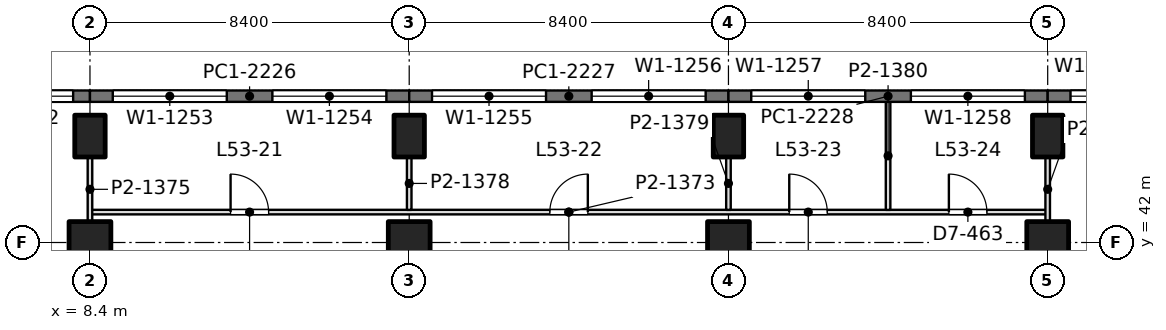
"""IFC4 building model, lengths in metres.
Left out: names, types, materials, properties, quantities, classifications, styles, units other than length and angle.
Written with IfcOpenShell. Run it as: python <this file> out.ifc"""

import sys

from ifc_helpers import new_model, si_unit, direction, frame, frame_2d, origin, origin_2d, place, context, subcontext, project, spatial, rectangle, extrude, element, fill, save


model = new_model("IFC4")
c1 = context("Model", 3, precision=1e-05, world=origin(), true_north=direction((0.0, 1.0)))
c2 = subcontext(c1, "Body", "Model", "MODEL_VIEW")
j1 = project(units=[si_unit("LENGTHUNIT", "METRE"), si_unit("PLANEANGLEUNIT", "RADIAN")], contexts=[c1])
p1 = place(None, origin())
s1 = spatial("IfcSite", under=j1, at=p1, CompositionType="ELEMENT")
p2 = place(p1, origin())
s2 = spatial("IfcBuilding", under=s1, at=p2, CompositionType="ELEMENT")
p3 = place(p2, frame((0.0, 0.0, 232.2)))
s3 = spatial("IfcBuildingStorey", under=s2, at=p3, CompositionType="ELEMENT", Elevation=232.2)
p4 = place(p3, frame((8.4, 42.0, 0.0), z_axis=(0.0, 0.0, 1.0), x_axis=(1.0, 0.0, 0.0)))
e1 = element("IfcColumn", 1, at=p4, inside=s3, PredefinedType="COLUMN", context=c2, shape_type="SweptSolid", body=[
    extrude(rectangle(XDim=1.1, YDim=1.1, at=origin_2d()), origin(), (0.0, 0.0, 1.0), 4.2),
])
p5 = place(p3, frame((8.4, 44.8, 0.0), z_axis=(0.0, 0.0, 1.0), x_axis=(1.0, 0.0, 0.0)))
e2 = element("IfcColumn", 2, at=p5, inside=s3, PredefinedType="COLUMN", context=c2, shape_type="SweptSolid", body=[
    extrude(rectangle(XDim=0.8, YDim=1.1, at=origin_2d()), origin(), (0.0, 0.0, 1.0), 4.2),
])
p6 = place(p3, frame((16.8, 42.0, 0.0), z_axis=(0.0, 0.0, 1.0), x_axis=(1.0, 0.0, 0.0)))
e3 = element("IfcColumn", 3, at=p6, inside=s3, PredefinedType="COLUMN", context=c2, shape_type="SweptSolid", body=[
    extrude(rectangle(XDim=1.1, YDim=1.1, at=origin_2d()), origin(), (0.0, 0.0, 1.0), 4.2),
])
p7 = place(p3, frame((16.8, 44.8, 0.0), z_axis=(0.0, 0.0, 1.0), x_axis=(1.0, 0.0, 0.0)))
e4 = element("IfcColumn", 4, at=p7, inside=s3, PredefinedType="COLUMN", context=c2, shape_type="SweptSolid", body=[
    extrude(rectangle(XDim=0.8, YDim=1.1, at=origin_2d()), origin(), (0.0, 0.0, 1.0), 4.2),
])
p8 = place(p3, frame((25.2, 42.0, 0.0), z_axis=(0.0, 0.0, 1.0), x_axis=(1.0, 0.0, 0.0)))
e5 = element("IfcColumn", 5, at=p8, inside=s3, PredefinedType="COLUMN", context=c2, shape_type="SweptSolid", body=[
    extrude(rectangle(XDim=1.1, YDim=1.1, at=origin_2d()), origin(), (0.0, 0.0, 1.0), 4.2),
])
p9 = place(p3, frame((25.2, 44.8, 0.0), z_axis=(0.0, 0.0, 1.0), x_axis=(1.0, 0.0, 0.0)))
e6 = element("IfcColumn", 6, at=p9, inside=s3, PredefinedType="COLUMN", context=c2, shape_type="SweptSolid", body=[
    extrude(rectangle(XDim=0.8, YDim=1.1, at=origin_2d()), origin(), (0.0, 0.0, 1.0), 4.2),
])
p10 = place(p3, frame((33.6, 42.0, 0.0), z_axis=(0.0, 0.0, 1.0), x_axis=(1.0, 0.0, 0.0)))
e7 = element("IfcColumn", 7, at=p10, inside=s3, PredefinedType="COLUMN", context=c2, shape_type="SweptSolid", body=[
    extrude(rectangle(XDim=1.1, YDim=1.1, at=origin_2d()), origin(), (0.0, 0.0, 1.0), 4.2),
])
p11 = place(p3, frame((33.6, 44.8, 0.0), z_axis=(0.0, 0.0, 1.0), x_axis=(1.0, 0.0, 0.0)))
e8 = element("IfcColumn", 8, at=p11, inside=s3, PredefinedType="COLUMN", context=c2, shape_type="SweptSolid", body=[
    extrude(rectangle(XDim=0.8, YDim=1.1, at=origin_2d()), origin(), (0.0, 0.0, 1.0), 4.2),
])
p12 = place(p3, frame((0.315, 45.85, 0.0), z_axis=(0.0, 0.0, 1.0), x_axis=(1.0, 0.0, 0.0)))
e9 = element("IfcWall", 9, at=p12, inside=s3, PredefinedType="SOLIDWALL", context=c2, shape_type="SweptSolid", body=[
    extrude(rectangle(XDim=8.085, YDim=0.3, at=frame_2d((4.042, 0.0))), origin(), (0.0, 0.0, 1.0), 4.05),
])
p13 = place(p12, frame((0.443, 0.0, 0.9)))
e10 = element("IfcOpeningElement", 10, at=p13, cuts=e9, PredefinedType="OPENING", context=c2, shape_type="SweptSolid", body=[
    extrude(rectangle(XDim=3.0, YDim=1.9, at=frame_2d((1.5, 0.95))), frame((0.0, 0.16, 0.0), z_axis=(0.0, -1.0, 0.0), x_axis=(1.0, 0.0, 0.0)), (0.0, 0.0, 1.0), 0.32),
])
p14 = place(p12, frame((4.643, 0.0, 0.9)))
e11 = element("IfcOpeningElement", 11, at=p14, cuts=e9, PredefinedType="OPENING", context=c2, shape_type="SweptSolid", body=[
    extrude(rectangle(XDim=3.0, YDim=1.9, at=frame_2d((1.5, 0.95))), frame((0.0, 0.16, 0.0), z_axis=(0.0, -1.0, 0.0), x_axis=(1.0, 0.0, 0.0)), (0.0, 0.0, 1.0), 0.32),
])
p15 = place(p3, frame((8.4, 45.85, 0.0), z_axis=(0.0, 0.0, 1.0), x_axis=(1.0, 0.0, 0.0)))
e12 = element("IfcWall", 12, at=p15, inside=s3, PredefinedType="SOLIDWALL", context=c2, shape_type="SweptSolid", body=[
    extrude(rectangle(XDim=8.4, YDim=0.3, at=frame_2d((4.2, 0.0))), origin(), (0.0, 0.0, 1.0), 4.05),
])
p16 = place(p15, frame((0.6, 0.0, 0.9)))
e13 = element("IfcOpeningElement", 13, at=p16, cuts=e12, PredefinedType="OPENING", context=c2, shape_type="SweptSolid", body=[
    extrude(rectangle(XDim=3.0, YDim=1.9, at=frame_2d((1.5, 0.95))), frame((0.0, 0.16, 0.0), z_axis=(0.0, -1.0, 0.0), x_axis=(1.0, 0.0, 0.0)), (0.0, 0.0, 1.0), 0.32),
])
p17 = place(p15, frame((4.8, 0.0, 0.9)))
e14 = element("IfcOpeningElement", 14, at=p17, cuts=e12, PredefinedType="OPENING", context=c2, shape_type="SweptSolid", body=[
    extrude(rectangle(XDim=3.0, YDim=1.9, at=frame_2d((1.5, 0.95))), frame((0.0, 0.16, 0.0), z_axis=(0.0, -1.0, 0.0), x_axis=(1.0, 0.0, 0.0)), (0.0, 0.0, 1.0), 0.32),
])
p18 = place(p3, frame((16.8, 45.85, 0.0), z_axis=(0.0, 0.0, 1.0), x_axis=(1.0, 0.0, 0.0)))
e15 = element("IfcWall", 15, at=p18, inside=s3, PredefinedType="SOLIDWALL", context=c2, shape_type="SweptSolid", body=[
    extrude(rectangle(XDim=8.4, YDim=0.3, at=frame_2d((4.2, 0.0))), origin(), (0.0, 0.0, 1.0), 4.05),
])
p19 = place(p18, frame((0.6, 0.0, 0.9)))
e16 = element("IfcOpeningElement", 16, at=p19, cuts=e15, PredefinedType="OPENING", context=c2, shape_type="SweptSolid", body=[
    extrude(rectangle(XDim=3.0, YDim=1.9, at=frame_2d((1.5, 0.95))), frame((0.0, 0.16, 0.0), z_axis=(0.0, -1.0, 0.0), x_axis=(1.0, 0.0, 0.0)), (0.0, 0.0, 1.0), 0.32),
])
p20 = place(p18, frame((4.8, 0.0, 0.9)))
e17 = element("IfcOpeningElement", 17, at=p20, cuts=e15, PredefinedType="OPENING", context=c2, shape_type="SweptSolid", body=[
    extrude(rectangle(XDim=3.0, YDim=1.9, at=frame_2d((1.5, 0.95))), frame((0.0, 0.16, 0.0), z_axis=(0.0, -1.0, 0.0), x_axis=(1.0, 0.0, 0.0)), (0.0, 0.0, 1.0), 0.32),
])
p21 = place(p3, frame((25.2, 45.85, 0.0), z_axis=(0.0, 0.0, 1.0), x_axis=(1.0, 0.0, 0.0)))
e18 = element("IfcWall", 18, at=p21, inside=s3, PredefinedType="SOLIDWALL", context=c2, shape_type="SweptSolid", body=[
    extrude(rectangle(XDim=8.4, YDim=0.3, at=frame_2d((4.2, 0.0))), origin(), (0.0, 0.0, 1.0), 4.05),
])
p22 = place(p21, frame((0.6, 0.0, 0.9)))
e19 = element("IfcOpeningElement", 19, at=p22, cuts=e18, PredefinedType="OPENING", context=c2, shape_type="SweptSolid", body=[
    extrude(rectangle(XDim=3.0, YDim=1.9, at=frame_2d((1.5, 0.95))), frame((0.0, 0.16, 0.0), z_axis=(0.0, -1.0, 0.0), x_axis=(1.0, 0.0, 0.0)), (0.0, 0.0, 1.0), 0.32),
])
p23 = place(p21, frame((4.8, 0.0, 0.9)))
e20 = element("IfcOpeningElement", 20, at=p23, cuts=e18, PredefinedType="OPENING", context=c2, shape_type="SweptSolid", body=[
    extrude(rectangle(XDim=3.0, YDim=1.9, at=frame_2d((1.5, 0.95))), frame((0.0, 0.16, 0.0), z_axis=(0.0, -1.0, 0.0), x_axis=(1.0, 0.0, 0.0)), (0.0, 0.0, 1.0), 0.32),
])
p24 = place(p3, frame((33.6, 45.85, 0.0), z_axis=(0.0, 0.0, 1.0), x_axis=(1.0, 0.0, 0.0)))
e21 = element("IfcWall", 21, at=p24, inside=s3, PredefinedType="SOLIDWALL", context=c2, shape_type="SweptSolid", body=[
    extrude(rectangle(XDim=8.4, YDim=0.3, at=frame_2d((4.2, 0.0))), origin(), (0.0, 0.0, 1.0), 4.05),
])
p25 = place(p24, frame((0.6, 0.0, 0.9)))
e22 = element("IfcOpeningElement", 22, at=p25, cuts=e21, PredefinedType="OPENING", context=c2, shape_type="SweptSolid", body=[
    extrude(rectangle(XDim=3.0, YDim=1.9, at=frame_2d((1.5, 0.95))), frame((0.0, 0.16, 0.0), z_axis=(0.0, -1.0, 0.0), x_axis=(1.0, 0.0, 0.0)), (0.0, 0.0, 1.0), 0.32),
])
p26 = place(p24, frame((4.8, 0.0, 0.9)))
e23 = element("IfcOpeningElement", 23, at=p26, cuts=e21, PredefinedType="OPENING", context=c2, shape_type="SweptSolid", body=[
    extrude(rectangle(XDim=3.0, YDim=1.9, at=frame_2d((1.5, 0.95))), frame((0.0, 0.16, 0.0), z_axis=(0.0, -1.0, 0.0), x_axis=(1.0, 0.0, 0.0)), (0.0, 0.0, 1.0), 0.32),
])
p27 = place(p3, frame((8.4, 42.8, 0.0), z_axis=(0.0, 0.0, 1.0), x_axis=(1.0, 0.0, 0.0)))
e24 = element("IfcWall", 24, at=p27, inside=s3, PredefinedType="PARTITIONING", context=c2, shape_type="SweptSolid", body=[
    extrude(rectangle(XDim=25.2, YDim=0.12, at=frame_2d((12.6, 0.0))), origin(), (0.0, 0.0, 1.0), 3.69),
])
p28 = place(p27, frame((3.7, 0.0, 0.0)))
e25 = element("IfcOpeningElement", 25, at=p28, cuts=e24, PredefinedType="OPENING", context=c2, shape_type="SweptSolid", body=[
    extrude(rectangle(XDim=1.0, YDim=2.4, at=frame_2d((0.5, 1.2))), frame((0.0, 0.07, 0.0), z_axis=(0.0, -1.0, 0.0), x_axis=(1.0, 0.0, 0.0)), (0.0, 0.0, 1.0), 0.14),
])
p29 = place(p27, frame((12.1, 0.0, 0.0)))
e26 = element("IfcOpeningElement", 26, at=p29, cuts=e24, PredefinedType="OPENING", context=c2, shape_type="SweptSolid", body=[
    extrude(rectangle(XDim=1.0, YDim=2.4, at=frame_2d((0.5, 1.2))), frame((0.0, 0.07, 0.0), z_axis=(0.0, -1.0, 0.0), x_axis=(1.0, 0.0, 0.0)), (0.0, 0.0, 1.0), 0.14),
])
p30 = place(p27, frame((18.4, 0.0, 0.0)))
e27 = element("IfcOpeningElement", 27, at=p30, cuts=e24, PredefinedType="OPENING", context=c2, shape_type="SweptSolid", body=[
    extrude(rectangle(XDim=1.0, YDim=2.4, at=frame_2d((0.5, 1.2))), frame((0.0, 0.07, 0.0), z_axis=(0.0, -1.0, 0.0), x_axis=(1.0, 0.0, 0.0)), (0.0, 0.0, 1.0), 0.14),
])
p31 = place(p27, frame((22.6, 0.0, 0.0)))
e28 = element("IfcOpeningElement", 28, at=p31, cuts=e24, PredefinedType="OPENING", context=c2, shape_type="SweptSolid", body=[
    extrude(rectangle(XDim=1.0, YDim=2.4, at=frame_2d((0.5, 1.2))), frame((0.0, 0.07, 0.0), z_axis=(0.0, -1.0, 0.0), x_axis=(1.0, 0.0, 0.0)), (0.0, 0.0, 1.0), 0.14),
])
p32 = place(p3, frame((8.4, 42.548, 0.0), z_axis=(0.0, 0.0, 1.0), x_axis=(0.0, 1.0, 0.0)))
e29 = element("IfcWall", 29, at=p32, inside=s3, PredefinedType="PARTITIONING", context=c2, shape_type="SweptSolid", body=[
    extrude(rectangle(XDim=1.703, YDim=0.12, at=frame_2d((0.852, 0.0))), origin(), (0.0, 0.0, 1.0), 3.69),
])
for number, where, z_axis, x_axis in (
    (30, (16.8, 42.858, 0.0), (0.0, 0.0, 1.0), (0.0, 1.0, 0.0)),
    (31, (25.2, 42.858, 0.0), (0.0, 0.0, 1.0), (0.0, 1.0, 0.0)),
):
    element("IfcWall", number, at=place(p3, frame(where, z_axis=z_axis, x_axis=x_axis)), inside=s3, PredefinedType="PARTITIONING", context=c2, shape_type="SweptSolid", body=[
        extrude(rectangle(XDim=1.393, YDim=0.12, at=frame_2d((0.697, 0.0))), origin(), (0.0, 0.0, 1.0), 3.69),
    ])
p33 = place(p3, frame((29.4, 42.858, 0.0), z_axis=(0.0, 0.0, 1.0), x_axis=(0.0, 1.0, 0.0)))
e32 = element("IfcWall", 32, at=p33, inside=s3, PredefinedType="PARTITIONING", context=c2, shape_type="SweptSolid", body=[
    extrude(rectangle(XDim=2.844, YDim=0.12, at=frame_2d((1.422, 0.0))), origin(), (0.0, 0.0, 1.0), 3.56),
])
p34 = place(p3, frame((33.6, 42.548, 0.0), z_axis=(0.0, 0.0, 1.0), x_axis=(0.0, 1.0, 0.0)))
e33 = element("IfcWall", 33, at=p34, inside=s3, PredefinedType="PARTITIONING", context=c2, shape_type="SweptSolid", body=[
    extrude(rectangle(XDim=1.703, YDim=0.12, at=frame_2d((0.852, 0.0))), origin(), (0.0, 0.0, 1.0), 3.69),
])
p35 = place(p14, origin())
e34 = element("IfcWindow", 34, at=p35, inside=s3, PartitioningType="SINGLE_PANEL", PredefinedType="WINDOW", context=c2, shape_type="SweptSolid", body=[
    extrude(rectangle(XDim=3.0, YDim=1.9, at=frame_2d((1.5, 0.95))), frame((0.0, 0.03, 0.0), z_axis=(0.0, -1.0, 0.0), x_axis=(1.0, 0.0, 0.0)), (0.0, 0.0, 1.0), 0.06),
])
fill(e11, e34)
p36 = place(p16, origin())
e35 = element("IfcWindow", 35, at=p36, inside=s3, PartitioningType="SINGLE_PANEL", PredefinedType="WINDOW", context=c2, shape_type="SweptSolid", body=[
    extrude(rectangle(XDim=3.0, YDim=1.9, at=frame_2d((1.5, 0.95))), frame((0.0, 0.03, 0.0), z_axis=(0.0, -1.0, 0.0), x_axis=(1.0, 0.0, 0.0)), (0.0, 0.0, 1.0), 0.06),
])
fill(e13, e35)
p37 = place(p17, origin())
e36 = element("IfcWindow", 36, at=p37, inside=s3, PartitioningType="SINGLE_PANEL", PredefinedType="WINDOW", context=c2, shape_type="SweptSolid", body=[
    extrude(rectangle(XDim=3.0, YDim=1.9, at=frame_2d((1.5, 0.95))), frame((0.0, 0.03, 0.0), z_axis=(0.0, -1.0, 0.0), x_axis=(1.0, 0.0, 0.0)), (0.0, 0.0, 1.0), 0.06),
])
fill(e14, e36)
p38 = place(p19, origin())
e37 = element("IfcWindow", 37, at=p38, inside=s3, PartitioningType="SINGLE_PANEL", PredefinedType="WINDOW", context=c2, shape_type="SweptSolid", body=[
    extrude(rectangle(XDim=3.0, YDim=1.9, at=frame_2d((1.5, 0.95))), frame((0.0, 0.03, 0.0), z_axis=(0.0, -1.0, 0.0), x_axis=(1.0, 0.0, 0.0)), (0.0, 0.0, 1.0), 0.06),
])
fill(e16, e37)
p39 = place(p20, origin())
e38 = element("IfcWindow", 38, at=p39, inside=s3, PartitioningType="SINGLE_PANEL", PredefinedType="WINDOW", context=c2, shape_type="SweptSolid", body=[
    extrude(rectangle(XDim=3.0, YDim=1.9, at=frame_2d((1.5, 0.95))), frame((0.0, 0.03, 0.0), z_axis=(0.0, -1.0, 0.0), x_axis=(1.0, 0.0, 0.0)), (0.0, 0.0, 1.0), 0.06),
])
fill(e17, e38)
p40 = place(p22, origin())
e39 = element("IfcWindow", 39, at=p40, inside=s3, PartitioningType="SINGLE_PANEL", PredefinedType="WINDOW", context=c2, shape_type="SweptSolid", body=[
    extrude(rectangle(XDim=3.0, YDim=1.9, at=frame_2d((1.5, 0.95))), frame((0.0, 0.03, 0.0), z_axis=(0.0, -1.0, 0.0), x_axis=(1.0, 0.0, 0.0)), (0.0, 0.0, 1.0), 0.06),
])
fill(e19, e39)
p41 = place(p23, origin())
e40 = element("IfcWindow", 40, at=p41, inside=s3, PartitioningType="SINGLE_PANEL", PredefinedType="WINDOW", context=c2, shape_type="SweptSolid", body=[
    extrude(rectangle(XDim=3.0, YDim=1.9, at=frame_2d((1.5, 0.95))), frame((0.0, 0.03, 0.0), z_axis=(0.0, -1.0, 0.0), x_axis=(1.0, 0.0, 0.0)), (0.0, 0.0, 1.0), 0.06),
])
fill(e20, e40)
p42 = place(p25, origin())
e41 = element("IfcWindow", 41, at=p42, inside=s3, PartitioningType="SINGLE_PANEL", PredefinedType="WINDOW", context=c2, shape_type="SweptSolid", body=[
    extrude(rectangle(XDim=3.0, YDim=1.9, at=frame_2d((1.5, 0.95))), frame((0.0, 0.03, 0.0), z_axis=(0.0, -1.0, 0.0), x_axis=(1.0, 0.0, 0.0)), (0.0, 0.0, 1.0), 0.06),
])
fill(e22, e41)
p43 = place(p28, origin())
e42 = element("IfcDoor", 42, at=p43, inside=s3, OperationType="SINGLE_SWING_LEFT", PredefinedType="DOOR", context=c2, shape_type="SweptSolid", body=[
    extrude(rectangle(XDim=1.0, YDim=2.4, at=frame_2d((0.5, 1.2))), frame((0.0, 0.025, 0.0), z_axis=(0.0, -1.0, 0.0), x_axis=(1.0, 0.0, 0.0)), (0.0, 0.0, 1.0), 0.05),
])
fill(e25, e42)
p44 = place(p29, origin())
e43 = element("IfcDoor", 43, at=p44, inside=s3, OperationType="SINGLE_SWING_RIGHT", PredefinedType="DOOR", context=c2, shape_type="SweptSolid", body=[
    extrude(rectangle(XDim=1.0, YDim=2.4, at=frame_2d((0.5, 1.2))), frame((0.0, 0.025, 0.0), z_axis=(0.0, -1.0, 0.0), x_axis=(1.0, 0.0, 0.0)), (0.0, 0.0, 1.0), 0.05),
])
fill(e26, e43)
p45 = place(p30, origin())
e44 = element("IfcDoor", 44, at=p45, inside=s3, OperationType="SINGLE_SWING_LEFT", PredefinedType="DOOR", context=c2, shape_type="SweptSolid", body=[
    extrude(rectangle(XDim=1.0, YDim=2.4, at=frame_2d((0.5, 1.2))), frame((0.0, 0.025, 0.0), z_axis=(0.0, -1.0, 0.0), x_axis=(1.0, 0.0, 0.0)), (0.0, 0.0, 1.0), 0.05),
])
fill(e27, e44)
p46 = place(p31, origin())
e45 = element("IfcDoor", 45, at=p46, inside=s3, OperationType="SINGLE_SWING_LEFT", PredefinedType="DOOR", context=c2, shape_type="SweptSolid", body=[
    extrude(rectangle(XDim=1.0, YDim=2.4, at=frame_2d((0.5, 1.2))), frame((0.0, 0.025, 0.0), z_axis=(0.0, -1.0, 0.0), x_axis=(1.0, 0.0, 0.0)), (0.0, 0.0, 1.0), 0.05),
])
fill(e28, e45)
save(model, sys.argv[1])
